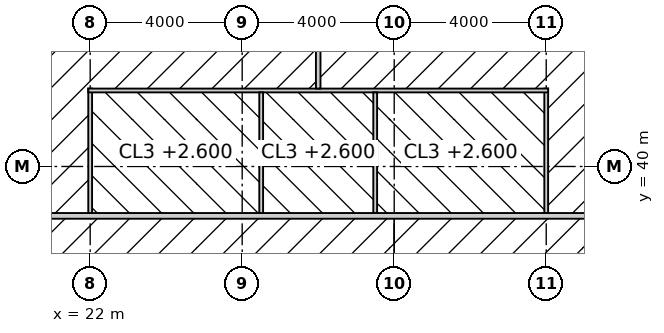
"""IFC4 building model, lengths in metres.
Left out: names, types, materials, properties, quantities, classifications, styles, units other than length and angle.
Written with IfcOpenShell. Run it as: python <this file> out.ifc"""

import sys

from ifc_helpers import new_model, si_unit, direction, frame, frame_2d, origin, place, context, subcontext, project, spatial, rectangle, extrude, element, fill, save


model = new_model("IFC4")
c1 = context("Model", 3, precision=1e-05, world=origin(), true_north=direction((0.0, 1.0)))
c2 = subcontext(c1, "Body", "Model", "MODEL_VIEW")
j1 = project(units=[si_unit("LENGTHUNIT", "METRE"), si_unit("PLANEANGLEUNIT", "RADIAN")], contexts=[c1])
p1 = place(None, origin())
s1 = spatial("IfcSite", under=j1, at=p1, CompositionType="ELEMENT")
p2 = place(p1, origin())
s2 = spatial("IfcBuilding", under=s1, at=p2, CompositionType="ELEMENT")
p3 = place(p2, frame((0.0, 0.0, 27.0)))
s3 = spatial("IfcBuildingStorey", under=s2, at=p3, CompositionType="ELEMENT", Elevation=27.0)
p4 = place(p3, frame((15.175, 38.7, 0.0), z_axis=(0.0, 0.0, 1.0), x_axis=(1.0, 0.0, 0.0)))
e1 = element("IfcWall", 1, at=p4, inside=s3, PredefinedType="PARTITIONING", context=c2, shape_type="SweptSolid", body=[
    extrude(rectangle(XDim=29.05, YDim=0.15, at=frame_2d((14.525, 0.0))), origin(), (0.0, 0.0, 1.0), 3.85),
])
p5 = place(p4, frame((8.575, 0.0, 0.0)))
e2 = element("IfcOpeningElement", 2, at=p5, cuts=e1, PredefinedType="OPENING", context=c2, shape_type="SweptSolid", body=[
    extrude(rectangle(XDim=0.9, YDim=2.1, at=frame_2d((0.45, 1.05))), frame((0.0, 0.085, 0.0), z_axis=(0.0, -1.0, 0.0), x_axis=(1.0, 0.0, 0.0)), (0.0, 0.0, 1.0), 0.17),
])
p6 = place(p4, frame((12.325, 0.0, 0.0)))
e3 = element("IfcOpeningElement", 3, at=p6, cuts=e1, PredefinedType="OPENING", context=c2, shape_type="SweptSolid", body=[
    extrude(rectangle(XDim=1.0, YDim=2.1, at=frame_2d((0.5, 1.05))), frame((0.0, 0.085, 0.0), z_axis=(0.0, -1.0, 0.0), x_axis=(1.0, 0.0, 0.0)), (0.0, 0.0, 1.0), 0.17),
])
p7 = place(p4, frame((16.175, 0.0, 0.0)))
e4 = element("IfcOpeningElement", 4, at=p7, cuts=e1, PredefinedType="OPENING", context=c2, shape_type="SweptSolid", body=[
    extrude(rectangle(XDim=0.9, YDim=2.1, at=frame_2d((0.45, 1.05))), frame((0.0, 0.085, 0.0), z_axis=(0.0, -1.0, 0.0), x_axis=(1.0, 0.0, 0.0)), (0.0, 0.0, 1.0), 0.17),
])
for number, where, z_axis, x_axis in (
    (5, (22.0, 38.775, 0.0), (0.0, 0.0, 1.0), (0.0, 1.0, 0.0)),
    (6, (34.0, 38.775, 0.0), (0.0, 0.0, 1.0), (0.0, 1.0, 0.0)),
):
    element("IfcWall", number, at=place(p3, frame(where, z_axis=z_axis, x_axis=x_axis)), inside=s3, PredefinedType="PARTITIONING", context=c2, shape_type="SweptSolid", body=[
        extrude(rectangle(XDim=3.275, YDim=0.1, at=frame_2d((1.638, 0.0))), origin(), (0.0, 0.0, 1.0), 2.95),
    ])
p8 = place(p3, frame((21.95, 42.0, 0.0), z_axis=(0.0, 0.0, 1.0), x_axis=(1.0, 0.0, 0.0)))
e7 = element("IfcWall", 7, at=p8, inside=s3, PredefinedType="PARTITIONING", context=c2, shape_type="SweptSolid", body=[
    extrude(rectangle(XDim=12.1, YDim=0.1, at=frame_2d((6.05, 0.0))), origin(), (0.0, 0.0, 1.0), 3.85),
])
for number, where, z_axis, x_axis in (
    (8, (26.5, 38.775, 0.0), (0.0, 0.0, 1.0), (0.0, 1.0, 0.0)),
    (9, (29.5, 38.775, 0.0), (0.0, 0.0, 1.0), (0.0, 1.0, 0.0)),
):
    element("IfcWall", number, at=place(p3, frame(where, z_axis=z_axis, x_axis=x_axis)), inside=s3, PredefinedType="PARTITIONING", context=c2, shape_type="SweptSolid", body=[
        extrude(rectangle(XDim=3.175, YDim=0.1, at=frame_2d((1.587, 0.0))), origin(), (0.0, 0.0, 1.0), 3.85),
    ])
p9 = place(p3, frame((28.0, 42.05, 0.0), z_axis=(0.0, 0.0, 1.0), x_axis=(0.0, 1.0, 0.0)))
e10 = element("IfcWall", 10, at=p9, inside=s3, PredefinedType="PARTITIONING", context=c2, shape_type="SweptSolid", body=[
    extrude(rectangle(XDim=1.65, YDim=0.12, at=frame_2d((0.825, 0.0))), origin(), (0.0, 0.0, 1.0), 3.85),
])
p10 = place(p5, origin())
e11 = element("IfcDoor", 11, at=p10, inside=s3, OperationType="SINGLE_SWING_LEFT", PredefinedType="DOOR", context=c2, shape_type="SweptSolid", body=[
    extrude(rectangle(XDim=0.9, YDim=2.1, at=frame_2d((0.45, 1.05))), frame((0.0, 0.025, 0.0), z_axis=(0.0, -1.0, 0.0), x_axis=(1.0, 0.0, 0.0)), (0.0, 0.0, 1.0), 0.05),
])
fill(e2, e11)
p11 = place(p6, origin())
e12 = element("IfcDoor", 12, at=p11, inside=s3, OperationType="SLIDING_TO_LEFT", PredefinedType="DOOR", context=c2, shape_type="SweptSolid", body=[
    extrude(rectangle(XDim=1.0, YDim=2.1, at=frame_2d((0.5, 1.05))), frame((0.0, 0.025, 0.0), z_axis=(0.0, -1.0, 0.0), x_axis=(1.0, 0.0, 0.0)), (0.0, 0.0, 1.0), 0.05),
])
fill(e3, e12)
p12 = place(p7, origin())
e13 = element("IfcDoor", 13, at=p12, inside=s3, OperationType="SINGLE_SWING_LEFT", PredefinedType="DOOR", context=c2, shape_type="SweptSolid", body=[
    extrude(rectangle(XDim=0.9, YDim=2.1, at=frame_2d((0.45, 1.05))), frame((0.0, 0.025, 0.0), z_axis=(0.0, -1.0, 0.0), x_axis=(1.0, 0.0, 0.0)), (0.0, 0.0, 1.0), 0.05),
])
fill(e4, e13)
save(model, sys.argv[1])
